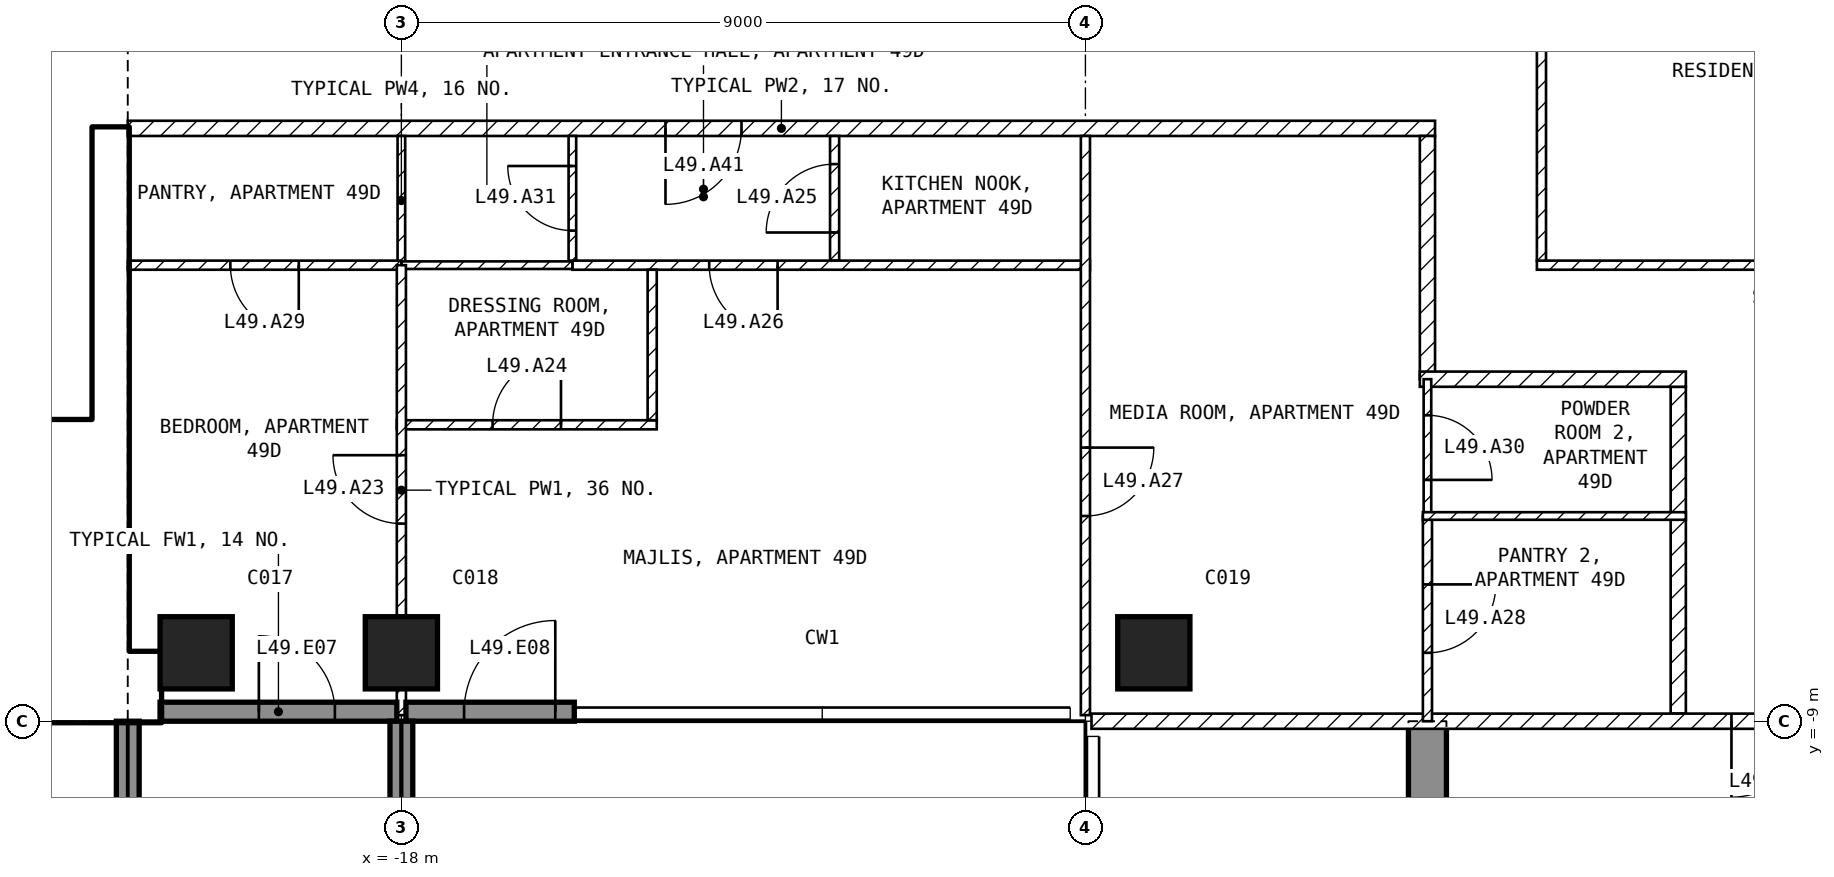
"""IFC4 building model, lengths in metres.
Left out: names, types, materials, properties, quantities, classifications, styles, units other than length and angle.
Written with IfcOpenShell. Run it as: python <this file> out.ifc"""

import sys

from ifc_helpers import new_model, si_unit, direction, frame, frame_2d, origin, origin_2d, place, context, subcontext, project, spatial, polyline, rectangle, outline, extrude, element, fill, save


model = new_model("IFC4")
c1 = context("Model", 3, precision=1e-05, world=origin(), true_north=direction((0.0, 1.0)))
c2 = subcontext(c1, "Body", "Model", "MODEL_VIEW")
j1 = project(units=[si_unit("LENGTHUNIT", "METRE"), si_unit("PLANEANGLEUNIT", "RADIAN")], contexts=[c1])
p1 = place(None, origin())
s1 = spatial("IfcSite", under=j1, at=p1, CompositionType="ELEMENT")
p2 = place(p1, origin())
s2 = spatial("IfcBuilding", under=s1, at=p2, CompositionType="ELEMENT")
p3 = place(p2, frame((0.0, 0.0, 198.1)))
s3 = spatial("IfcBuildingStorey", under=s2, at=p3, CompositionType="ELEMENT", Elevation=198.1)
for number, where, z_axis, x_axis in (
    (1, (-20.7, -8.1, -0.25), (0.0, 0.0, 1.0), (1.0, 0.0, 0.0)),
    (2, (-18.0, -8.1, -0.25), (0.0, 0.0, 1.0), (1.0, 0.0, 0.0)),
    (3, (-8.1, -8.1, -0.25), (0.0, 0.0, 1.0), (1.0, 0.0, 0.0)),
):
    element("IfcColumn", number, at=place(p3, frame(where, z_axis=z_axis, x_axis=x_axis)), inside=s3, PredefinedType="COLUMN", context=c2, shape_type="SweptSolid", body=[
        extrude(rectangle(XDim=0.95, YDim=0.95, at=origin_2d()), origin(), (0.0, 0.0, 1.0), 3.5),
    ])
p4 = place(p3, frame((-4.75, -20.225, -0.25), z_axis=(1.0, 0.0, 0.0), x_axis=(0.0, 1.0, 0.0)))
e4 = element("IfcWall", 4, at=p4, inside=s3, PredefinedType="SHEAR", context=c2, shape_type="SweptSolid", body=[
    extrude(outline(polyline([(0.0, 0.0), (6.725, 0.0), (6.725, 2.65), (9.125, 2.65), (9.125, 0.0), (11.225, 0.0), (11.225, 3.5), (0.0, 3.5), (0.0, 0.0)])), origin(), (0.0, 0.0, 1.0), 0.5),
])
p5 = place(p3, frame((-21.175, -8.875, 0.0), z_axis=(0.0, 0.0, 1.0), x_axis=(1.0, 0.0, 0.0)))
e5 = element("IfcWall", 5, at=p5, inside=s3, PredefinedType="SOLIDWALL", context=c2, shape_type="SweptSolid", body=[
    extrude(rectangle(XDim=3.115, YDim=0.25, at=frame_2d((1.558, 0.0))), origin(), (0.0, 0.0, 1.0), 3.25),
])
p6 = place(p5, frame((1.3, 0.0, 0.0)))
e6 = element("IfcOpeningElement", 6, at=p6, cuts=e5, PredefinedType="OPENING", context=c2, shape_type="SweptSolid", body=[
    extrude(rectangle(XDim=1.0, YDim=2.4, at=frame_2d((0.5, 1.2))), frame((0.0, 0.135, 0.0), z_axis=(0.0, -1.0, 0.0), x_axis=(1.0, 0.0, 0.0)), (0.0, 0.0, 1.0), 0.27),
])
p7 = place(p3, frame((-17.94, -8.875, 0.0), z_axis=(0.0, 0.0, 1.0), x_axis=(1.0, 0.0, 0.0)))
e7 = element("IfcWall", 7, at=p7, inside=s3, PredefinedType="SOLIDWALL", context=c2, shape_type="SweptSolid", body=[
    extrude(rectangle(XDim=2.215, YDim=0.25, at=frame_2d((1.107, 0.0))), origin(), (0.0, 0.0, 1.0), 3.25),
])
p8 = place(p7, frame((0.765, 0.0, 0.0)))
e8 = element("IfcOpeningElement", 8, at=p8, cuts=e7, PredefinedType="OPENING", context=c2, shape_type="SweptSolid", body=[
    extrude(rectangle(XDim=1.2, YDim=2.4, at=frame_2d((0.6, 1.2))), frame((0.0, 0.135, 0.0), z_axis=(0.0, -1.0, 0.0), x_axis=(1.0, 0.0, 0.0)), (0.0, 0.0, 1.0), 0.27),
])
for number, where, z_axis, x_axis in (
    (9, (-21.6, -9.0, 0.0), (0.0, 0.0, 1.0), (0.0, -1.0, 0.0)),
    (10, (-18.0, -9.0, 0.0), (0.0, 0.0, 1.0), (0.0, -1.0, 0.0)),
):
    element("IfcWall", number, at=place(p3, frame(where, z_axis=z_axis, x_axis=x_axis)), inside=s3, PredefinedType="SOLIDWALL", context=c2, shape_type="SweptSolid", body=[
        extrude(rectangle(XDim=2.7, YDim=0.3, at=frame_2d((1.35, 0.0))), origin(), (0.0, 0.0, 1.0), 3.25),
    ])
p9 = place(p3, frame((-30.2, -8.55, 0.0), z_axis=(0.0, 0.0, 1.0), x_axis=(1.0, 0.0, 0.0)))
e11 = element("IfcWall", 11, at=p9, inside=s3, PredefinedType="SHEAR", context=c2, shape_type="SweptSolid", body=[
    extrude(rectangle(XDim=9.025, YDim=0.9, at=frame_2d((4.512, 0.0))), origin(), (0.0, 0.0, 1.0), 3.25),
])
p10 = place(p3, frame((-21.825, -8.1, 0.0), z_axis=(0.0, 0.0, 1.0), x_axis=(0.0, 1.0, 0.0)))
e12 = element("IfcWall", 12, at=p10, inside=s3, PredefinedType="SHEAR", context=c2, shape_type="SweptSolid", body=[
    extrude(rectangle(XDim=6.9, YDim=0.45, at=frame_2d((3.45, 0.0))), origin(), (0.0, 0.0, 1.0), 3.25),
])
p11 = place(p3, frame((-28.35, -5.15, 0.0), z_axis=(0.0, 0.0, 1.0), x_axis=(1.0, 0.0, 0.0)))
e13 = element("IfcWall", 13, at=p11, inside=s3, PredefinedType="SOLIDWALL", context=c2, shape_type="SweptSolid", body=[
    extrude(rectangle(XDim=6.3, YDim=0.2, at=frame_2d((3.15, 0.0))), origin(), (0.0, 0.0, 1.0), 3.25),
])
p12 = place(p11, frame((5.1, 0.0, 0.0)))
e14 = element("IfcOpeningElement", 14, at=p12, cuts=e13, PredefinedType="OPENING", context=c2, shape_type="SweptSolid", body=[
    extrude(rectangle(XDim=1.0, YDim=2.1, at=frame_2d((0.5, 1.05))), frame((0.0, 0.11, 0.0), z_axis=(0.0, -1.0, 0.0), x_axis=(1.0, 0.0, 0.0)), (0.0, 0.0, 1.0), 0.22),
])
p13 = place(p3, frame((-3.06, -3.0, 0.0), z_axis=(0.0, 0.0, 1.0), x_axis=(1.0, 0.0, 0.0)))
e15 = element("IfcWall", 15, at=p13, inside=s3, PredefinedType="PARTITIONING", context=c2, shape_type="SweptSolid", body=[
    extrude(rectangle(XDim=6.12, YDim=0.12, at=frame_2d((3.06, 0.0))), origin(), (0.0, 0.0, 1.0), 3.25),
])
p14 = place(p3, frame((-3.0, 2.94, 0.0), z_axis=(0.0, 0.0, 1.0), x_axis=(0.0, -1.0, 0.0)))
e16 = element("IfcWall", 16, at=p14, inside=s3, PredefinedType="PARTITIONING", context=c2, shape_type="SweptSolid", body=[
    extrude(rectangle(XDim=5.88, YDim=0.12, at=frame_2d((2.94, 0.0))), origin(), (0.0, 0.0, 1.0), 3.25),
])
p15 = place(p3, frame((-4.4, -1.2, 0.0), z_axis=(0.0, 0.0, 1.0), x_axis=(-1.0, 0.0, 0.0)))
e17 = element("IfcWall", 17, at=p15, inside=s3, PredefinedType="PARTITIONING", context=c2, shape_type="SweptSolid", body=[
    extrude(rectangle(XDim=17.2, YDim=0.2, at=frame_2d((8.6, 0.0))), origin(), (0.0, 0.0, 1.0), 3.25),
])
p16 = place(p15, frame((9.125, 0.0, 0.0)))
e18 = element("IfcOpeningElement", 18, at=p16, cuts=e17, PredefinedType="OPENING", context=c2, shape_type="SweptSolid", body=[
    extrude(rectangle(XDim=1.0, YDim=2.1, at=frame_2d((0.5, 1.05))), frame((0.0, 0.11, 0.0), z_axis=(0.0, -1.0, 0.0), x_axis=(1.0, 0.0, 0.0)), (0.0, 0.0, 1.0), 0.22),
])
p17 = place(p3, frame((-4.5, -4.5, 0.0), z_axis=(0.0, 0.0, 1.0), x_axis=(0.0, 1.0, 0.0)))
e19 = element("IfcWall", 19, at=p17, inside=s3, PredefinedType="PARTITIONING", context=c2, shape_type="SweptSolid", body=[
    extrude(rectangle(XDim=3.2, YDim=0.2, at=frame_2d((1.6, 0.0))), origin(), (0.0, 0.0, 1.0), 3.25),
])
p18 = place(p3, frame((-1.2, -8.9, 0.0), z_axis=(0.0, 0.0, 1.0), x_axis=(0.0, 1.0, 0.0)))
e20 = element("IfcWall", 20, at=p18, inside=s3, PredefinedType="PARTITIONING", context=c2, shape_type="SweptSolid", body=[
    extrude(rectangle(XDim=4.3, YDim=0.2, at=frame_2d((2.15, 0.0))), origin(), (0.0, 0.0, 1.0), 3.25),
])
p19 = place(p3, frame((-1.1, -4.5, 0.0), z_axis=(0.0, 0.0, 1.0), x_axis=(-1.0, 0.0, 0.0)))
e21 = element("IfcWall", 21, at=p19, inside=s3, PredefinedType="PARTITIONING", context=c2, shape_type="SweptSolid", body=[
    extrude(rectangle(XDim=3.5, YDim=0.2, at=frame_2d((1.75, 0.0))), origin(), (0.0, 0.0, 1.0), 3.25),
])
p20 = place(p3, frame((8.92, -9.0, 0.0), z_axis=(0.0, 0.0, 1.0), x_axis=(-1.0, 0.0, 0.0)))
e22 = element("IfcWall", 22, at=p20, inside=s3, PredefinedType="PARTITIONING", context=c2, shape_type="SweptSolid", body=[
    extrude(rectangle(XDim=17.84, YDim=0.2, at=frame_2d((8.92, 0.0))), origin(), (0.0, 0.0, 1.0), 3.25),
])
p21 = place(p20, frame((8.42, 0.0, 0.0)))
e23 = element("IfcOpeningElement", 23, at=p21, cuts=e22, PredefinedType="OPENING", context=c2, shape_type="SweptSolid", body=[
    extrude(rectangle(XDim=1.0, YDim=2.1, at=frame_2d((0.5, 1.05))), frame((0.0, 0.11, 0.0), z_axis=(0.0, -1.0, 0.0), x_axis=(1.0, 0.0, 0.0)), (0.0, 0.0, 1.0), 0.22),
])
p22 = place(p3, frame((-12.3, -2.94, 0.0), z_axis=(0.0, 0.0, 1.0), x_axis=(0.0, 1.0, 0.0)))
e24 = element("IfcWall", 24, at=p22, inside=s3, PredefinedType="PARTITIONING", context=c2, shape_type="SweptSolid", body=[
    extrude(rectangle(XDim=1.64, YDim=0.12, at=frame_2d((0.82, 0.0))), origin(), (0.0, 0.0, 1.0), 3.25),
])
p23 = place(p22, frame((0.37, 0.0, 0.0)))
e25 = element("IfcOpeningElement", 25, at=p23, cuts=e24, PredefinedType="OPENING", context=c2, shape_type="SweptSolid", body=[
    extrude(rectangle(XDim=0.9, YDim=2.1, at=frame_2d((0.45, 1.05))), frame((0.0, 0.07, 0.0), z_axis=(0.0, -1.0, 0.0), x_axis=(1.0, 0.0, 0.0)), (0.0, 0.0, 1.0), 0.14),
])
p24 = place(p3, frame((-8.94, -3.0, 0.0), z_axis=(0.0, 0.0, 1.0), x_axis=(-1.0, 0.0, 0.0)))
e26 = element("IfcWall", 26, at=p24, inside=s3, PredefinedType="PARTITIONING", context=c2, shape_type="SweptSolid", body=[
    extrude(rectangle(XDim=6.81, YDim=0.12, at=frame_2d((3.405, 0.0))), origin(), (0.0, 0.0, 1.0), 3.25),
])
p25 = place(p24, frame((4.11, 0.0, 0.0)))
e27 = element("IfcOpeningElement", 27, at=p25, cuts=e26, PredefinedType="OPENING", context=c2, shape_type="SweptSolid", body=[
    extrude(rectangle(XDim=0.9, YDim=2.1, at=frame_2d((0.45, 1.05))), frame((0.0, 0.07, 0.0), z_axis=(0.0, -1.0, 0.0), x_axis=(1.0, 0.0, 0.0)), (0.0, 0.0, 1.0), 0.14),
])
p26 = place(p3, frame((-9.0, -1.3, 0.0), z_axis=(0.0, 0.0, 1.0), x_axis=(0.0, -1.0, 0.0)))
e28 = element("IfcWall", 28, at=p26, inside=s3, PredefinedType="PARTITIONING", context=c2, shape_type="SweptSolid", body=[
    extrude(rectangle(XDim=7.62, YDim=0.12, at=frame_2d((3.81, 0.0))), origin(), (0.0, 0.0, 1.0), 3.25),
])
p27 = place(p26, frame((4.1, 0.0, 0.0)))
e29 = element("IfcOpeningElement", 29, at=p27, cuts=e28, PredefinedType="OPENING", context=c2, shape_type="SweptSolid", body=[
    extrude(rectangle(XDim=0.9, YDim=2.1, at=frame_2d((0.45, 1.05))), frame((0.0, 0.07, 0.0), z_axis=(0.0, -1.0, 0.0), x_axis=(1.0, 0.0, 0.0)), (0.0, 0.0, 1.0), 0.14),
])
p28 = place(p3, frame((-15.75, -2.94, 0.0), z_axis=(0.0, 0.0, 1.0), x_axis=(0.0, 1.0, 0.0)))
e30 = element("IfcWall", 30, at=p28, inside=s3, PredefinedType="PARTITIONING", context=c2, shape_type="SweptSolid", body=[
    extrude(rectangle(XDim=1.64, YDim=0.1, at=frame_2d((0.82, 0.0))), origin(), (0.0, 0.0, 1.0), 3.25),
])
p29 = place(p28, frame((0.395, 0.0, 0.0)))
e31 = element("IfcOpeningElement", 31, at=p29, cuts=e30, PredefinedType="OPENING", context=c2, shape_type="SweptSolid", body=[
    extrude(rectangle(XDim=0.85, YDim=2.1, at=frame_2d((0.425, 1.05))), frame((0.0, 0.06, 0.0), z_axis=(0.0, -1.0, 0.0), x_axis=(1.0, 0.0, 0.0)), (0.0, 0.0, 1.0), 0.12),
])
p30 = place(p3, frame((-18.0, -3.0, 0.0), z_axis=(0.0, 0.0, 1.0), x_axis=(0.0, 1.0, 0.0)))
e32 = element("IfcWall", 32, at=p30, inside=s3, PredefinedType="PARTITIONING", context=c2, shape_type="SweptSolid", body=[
    extrude(rectangle(XDim=1.7, YDim=0.1, at=frame_2d((0.85, 0.0))), origin(), (0.0, 0.0, 1.0), 2.48),
])
p31 = place(p3, frame((-15.75, -3.0, 0.0), z_axis=(0.0, 0.0, 1.0), x_axis=(-1.0, 0.0, 0.0)))
e33 = element("IfcWall", 33, at=p31, inside=s3, PredefinedType="PARTITIONING", context=c2, shape_type="SweptSolid", body=[
    extrude(rectangle(XDim=2.25, YDim=0.1, at=frame_2d((1.125, 0.0))), origin(), (0.0, 0.0, 1.0), 3.25),
])
p32 = place(p3, frame((-18.0, -3.0, 0.0), z_axis=(0.0, 0.0, 1.0), x_axis=(-1.0, 0.0, 0.0)))
e34 = element("IfcWall", 34, at=p32, inside=s3, PredefinedType="PARTITIONING", context=c2, shape_type="SweptSolid", body=[
    extrude(rectangle(XDim=3.6, YDim=0.12, at=frame_2d((1.8, 0.0))), origin(), (0.0, 0.0, 1.0), 3.25),
])
p33 = place(p32, frame((1.35, 0.0, 0.0)))
e35 = element("IfcOpeningElement", 35, at=p33, cuts=e34, PredefinedType="OPENING", context=c2, shape_type="SweptSolid", body=[
    extrude(rectangle(XDim=0.9, YDim=2.1, at=frame_2d((0.45, 1.05))), frame((0.0, 0.07, 0.0), z_axis=(0.0, -1.0, 0.0), x_axis=(1.0, 0.0, 0.0)), (0.0, 0.0, 1.0), 0.14),
])
p34 = place(p3, frame((-18.06, -5.1, 0.0), z_axis=(0.0, 0.0, 1.0), x_axis=(1.0, 0.0, 0.0)))
e36 = element("IfcWall", 36, at=p34, inside=s3, PredefinedType="PARTITIONING", context=c2, shape_type="SweptSolid", body=[
    extrude(rectangle(XDim=3.42, YDim=0.12, at=frame_2d((1.71, 0.0))), origin(), (0.0, 0.0, 1.0), 3.25),
])
p35 = place(p34, frame((1.26, 0.0, 0.0)))
e37 = element("IfcOpeningElement", 37, at=p35, cuts=e36, PredefinedType="OPENING", context=c2, shape_type="SweptSolid", body=[
    extrude(rectangle(XDim=0.9, YDim=2.1, at=frame_2d((0.45, 1.05))), frame((0.0, 0.07, 0.0), z_axis=(0.0, -1.0, 0.0), x_axis=(1.0, 0.0, 0.0)), (0.0, 0.0, 1.0), 0.14),
])
p36 = place(p3, frame((-14.7, -5.04, 0.0), z_axis=(0.0, 0.0, 1.0), x_axis=(0.0, 1.0, 0.0)))
e38 = element("IfcWall", 38, at=p36, inside=s3, PredefinedType="PARTITIONING", context=c2, shape_type="SweptSolid", body=[
    extrude(rectangle(XDim=1.98, YDim=0.12, at=frame_2d((0.99, 0.0))), origin(), (0.0, 0.0, 1.0), 3.25),
])
p37 = place(p3, frame((-18.0, -8.92, 0.0), z_axis=(0.0, 0.0, 1.0), x_axis=(0.0, 1.0, 0.0)))
e39 = element("IfcWall", 39, at=p37, inside=s3, PredefinedType="PARTITIONING", context=c2, shape_type="SweptSolid", body=[
    extrude(rectangle(XDim=5.92, YDim=0.12, at=frame_2d((2.96, 0.0))), origin(), (0.0, 0.0, 1.0), 2.48),
])
p38 = place(p37, frame((2.52, 0.0, 0.0)))
e40 = element("IfcOpeningElement", 40, at=p38, cuts=e39, PredefinedType="OPENING", context=c2, shape_type="SweptSolid", body=[
    extrude(rectangle(XDim=0.9, YDim=2.1, at=frame_2d((0.45, 1.05))), frame((0.0, 0.07, 0.0), z_axis=(0.0, -1.0, 0.0), x_axis=(1.0, 0.0, 0.0)), (0.0, 0.0, 1.0), 0.14),
])
p39 = place(p3, frame((-4.5, -4.5, 0.0), z_axis=(0.0, 0.0, 1.0), x_axis=(0.0, -1.0, 0.0)))
e41 = element("IfcWall", 41, at=p39, inside=s3, PredefinedType="PARTITIONING", context=c2, shape_type="SweptSolid", body=[
    extrude(rectangle(XDim=1.8, YDim=0.1, at=frame_2d((0.9, 0.0))), origin(), (0.0, 0.0, 1.0), 3.25),
])
p40 = place(p39, frame((0.475, 0.0, 0.0)))
e42 = element("IfcOpeningElement", 42, at=p40, cuts=e41, PredefinedType="OPENING", context=c2, shape_type="SweptSolid", body=[
    extrude(rectangle(XDim=0.85, YDim=2.1, at=frame_2d((0.425, 1.05))), frame((0.0, 0.06, 0.0), z_axis=(0.0, -1.0, 0.0), x_axis=(1.0, 0.0, 0.0)), (0.0, 0.0, 1.0), 0.12),
])
p41 = place(p3, frame((-4.5, -6.3, 0.0), z_axis=(0.0, 0.0, 1.0), x_axis=(0.0, -1.0, 0.0)))
e43 = element("IfcWall", 43, at=p41, inside=s3, PredefinedType="PARTITIONING", context=c2, shape_type="SweptSolid", body=[
    extrude(rectangle(XDim=2.7, YDim=0.12, at=frame_2d((1.35, 0.0))), origin(), (0.0, 0.0, 1.0), 3.25),
])
p42 = place(p41, frame((0.9, 0.0, 0.0)))
e44 = element("IfcOpeningElement", 44, at=p42, cuts=e43, PredefinedType="OPENING", context=c2, shape_type="SweptSolid", body=[
    extrude(rectangle(XDim=0.9, YDim=2.1, at=frame_2d((0.45, 1.05))), frame((0.0, 0.07, 0.0), z_axis=(0.0, -1.0, 0.0), x_axis=(1.0, 0.0, 0.0)), (0.0, 0.0, 1.0), 0.14),
])
p43 = place(p3, frame((-1.1, -6.3, 0.0), z_axis=(0.0, 0.0, 1.0), x_axis=(-1.0, 0.0, 0.0)))
e45 = element("IfcWall", 45, at=p43, inside=s3, PredefinedType="PARTITIONING", context=c2, shape_type="SweptSolid", body=[
    extrude(rectangle(XDim=3.46, YDim=0.1, at=frame_2d((1.73, 0.0))), origin(), (0.0, 0.0, 1.0), 3.25),
])
p44 = place(p6, origin())
e46 = element("IfcDoor", 46, at=p44, inside=s3, OperationType="SINGLE_SWING_LEFT", PredefinedType="DOOR", context=c2, shape_type="SweptSolid", body=[
    extrude(rectangle(XDim=1.0, YDim=2.4, at=frame_2d((0.5, 1.2))), frame((0.0, 0.025, 0.0), z_axis=(0.0, -1.0, 0.0), x_axis=(1.0, 0.0, 0.0)), (0.0, 0.0, 1.0), 0.05),
])
fill(e6, e46)
p45 = place(p8, origin())
e47 = element("IfcDoor", 47, at=p45, inside=s3, OperationType="SINGLE_SWING_RIGHT", PredefinedType="DOOR", context=c2, shape_type="SweptSolid", body=[
    extrude(rectangle(XDim=1.2, YDim=2.4, at=frame_2d((0.6, 1.2))), frame((0.0, 0.025, 0.0), z_axis=(0.0, -1.0, 0.0), x_axis=(1.0, 0.0, 0.0)), (0.0, 0.0, 1.0), 0.05),
])
fill(e8, e47)
p46 = place(p12, origin())
e48 = element("IfcDoor", 48, at=p46, inside=s3, OperationType="SINGLE_SWING_LEFT", PredefinedType="DOOR", context=c2, shape_type="SweptSolid", body=[
    extrude(rectangle(XDim=1.0, YDim=2.1, at=frame_2d((0.5, 1.05))), frame((0.0, 0.025, 0.0), z_axis=(0.0, -1.0, 0.0), x_axis=(1.0, 0.0, 0.0)), (0.0, 0.0, 1.0), 0.05),
])
fill(e14, e48)
p47 = place(p38, origin())
e49 = element("IfcDoor", 49, at=p47, inside=s3, OperationType="SINGLE_SWING_RIGHT", PredefinedType="DOOR", context=c2, shape_type="SweptSolid", body=[
    extrude(rectangle(XDim=0.9, YDim=2.1, at=frame_2d((0.45, 1.05))), frame((0.0, 0.025, 0.0), z_axis=(0.0, -1.0, 0.0), x_axis=(1.0, 0.0, 0.0)), (0.0, 0.0, 1.0), 0.05),
])
fill(e40, e49)
p48 = place(p35, origin())
e50 = element("IfcDoor", 50, at=p48, inside=s3, OperationType="SINGLE_SWING_RIGHT", PredefinedType="DOOR", context=c2, shape_type="SweptSolid", body=[
    extrude(rectangle(XDim=0.9, YDim=2.1, at=frame_2d((0.45, 1.05))), frame((0.0, 0.025, 0.0), z_axis=(0.0, -1.0, 0.0), x_axis=(1.0, 0.0, 0.0)), (0.0, 0.0, 1.0), 0.05),
])
fill(e37, e50)
p49 = place(p23, origin())
e51 = element("IfcDoor", 51, at=p49, inside=s3, OperationType="SINGLE_SWING_LEFT", PredefinedType="DOOR", context=c2, shape_type="SweptSolid", body=[
    extrude(rectangle(XDim=0.9, YDim=2.1, at=frame_2d((0.45, 1.05))), frame((0.0, 0.025, 0.0), z_axis=(0.0, -1.0, 0.0), x_axis=(1.0, 0.0, 0.0)), (0.0, 0.0, 1.0), 0.05),
])
fill(e25, e51)
p50 = place(p25, origin())
e52 = element("IfcDoor", 52, at=p50, inside=s3, OperationType="SINGLE_SWING_LEFT", PredefinedType="DOOR", context=c2, shape_type="SweptSolid", body=[
    extrude(rectangle(XDim=0.9, YDim=2.1, at=frame_2d((0.45, 1.05))), frame((0.0, 0.025, 0.0), z_axis=(0.0, -1.0, 0.0), x_axis=(1.0, 0.0, 0.0)), (0.0, 0.0, 1.0), 0.05),
])
fill(e27, e52)
p51 = place(p27, origin())
e53 = element("IfcDoor", 53, at=p51, inside=s3, OperationType="SINGLE_SWING_LEFT", PredefinedType="DOOR", context=c2, shape_type="SweptSolid", body=[
    extrude(rectangle(XDim=0.9, YDim=2.1, at=frame_2d((0.45, 1.05))), frame((0.0, 0.025, 0.0), z_axis=(0.0, -1.0, 0.0), x_axis=(1.0, 0.0, 0.0)), (0.0, 0.0, 1.0), 0.05),
])
fill(e29, e53)
p52 = place(p42, origin())
e54 = element("IfcDoor", 54, at=p52, inside=s3, OperationType="SINGLE_SWING_LEFT", PredefinedType="DOOR", context=c2, shape_type="SweptSolid", body=[
    extrude(rectangle(XDim=0.9, YDim=2.1, at=frame_2d((0.45, 1.05))), frame((0.0, 0.025, 0.0), z_axis=(0.0, -1.0, 0.0), x_axis=(1.0, 0.0, 0.0)), (0.0, 0.0, 1.0), 0.05),
])
fill(e44, e54)
p53 = place(p33, origin())
e55 = element("IfcDoor", 55, at=p53, inside=s3, OperationType="SINGLE_SWING_LEFT", PredefinedType="DOOR", context=c2, shape_type="SweptSolid", body=[
    extrude(rectangle(XDim=0.9, YDim=2.1, at=frame_2d((0.45, 1.05))), frame((0.0, 0.025, 0.0), z_axis=(0.0, -1.0, 0.0), x_axis=(1.0, 0.0, 0.0)), (0.0, 0.0, 1.0), 0.05),
])
fill(e35, e55)
p54 = place(p40, origin())
e56 = element("IfcDoor", 56, at=p54, inside=s3, OperationType="SINGLE_SWING_RIGHT", PredefinedType="DOOR", context=c2, shape_type="SweptSolid", body=[
    extrude(rectangle(XDim=0.85, YDim=2.1, at=frame_2d((0.425, 1.05))), frame((0.0, 0.025, 0.0), z_axis=(0.0, -1.0, 0.0), x_axis=(1.0, 0.0, 0.0)), (0.0, 0.0, 1.0), 0.05),
])
fill(e42, e56)
p55 = place(p29, origin())
e57 = element("IfcDoor", 57, at=p55, inside=s3, OperationType="SINGLE_SWING_RIGHT", PredefinedType="DOOR", context=c2, shape_type="SweptSolid", body=[
    extrude(rectangle(XDim=0.85, YDim=2.1, at=frame_2d((0.425, 1.05))), frame((0.0, 0.025, 0.0), z_axis=(0.0, -1.0, 0.0), x_axis=(1.0, 0.0, 0.0)), (0.0, 0.0, 1.0), 0.05),
])
fill(e31, e57)
p56 = place(p21, origin())
e58 = element("IfcDoor", 58, at=p56, inside=s3, OperationType="SINGLE_SWING_RIGHT", PredefinedType="DOOR", context=c2, shape_type="SweptSolid", body=[
    extrude(rectangle(XDim=1.0, YDim=2.1, at=frame_2d((0.5, 1.05))), frame((0.0, 0.025, 0.0), z_axis=(0.0, -1.0, 0.0), x_axis=(1.0, 0.0, 0.0)), (0.0, 0.0, 1.0), 0.05),
])
fill(e23, e58)
p57 = place(p16, origin())
e59 = element("IfcDoor", 59, at=p57, inside=s3, OperationType="SINGLE_SWING_RIGHT", PredefinedType="DOOR", context=c2, shape_type="SweptSolid", body=[
    extrude(rectangle(XDim=1.0, YDim=2.1, at=frame_2d((0.5, 1.05))), frame((0.0, 0.025, 0.0), z_axis=(0.0, -1.0, 0.0), x_axis=(1.0, 0.0, 0.0)), (0.0, 0.0, 1.0), 0.05),
])
fill(e18, e59)
save(model, sys.argv[1])
